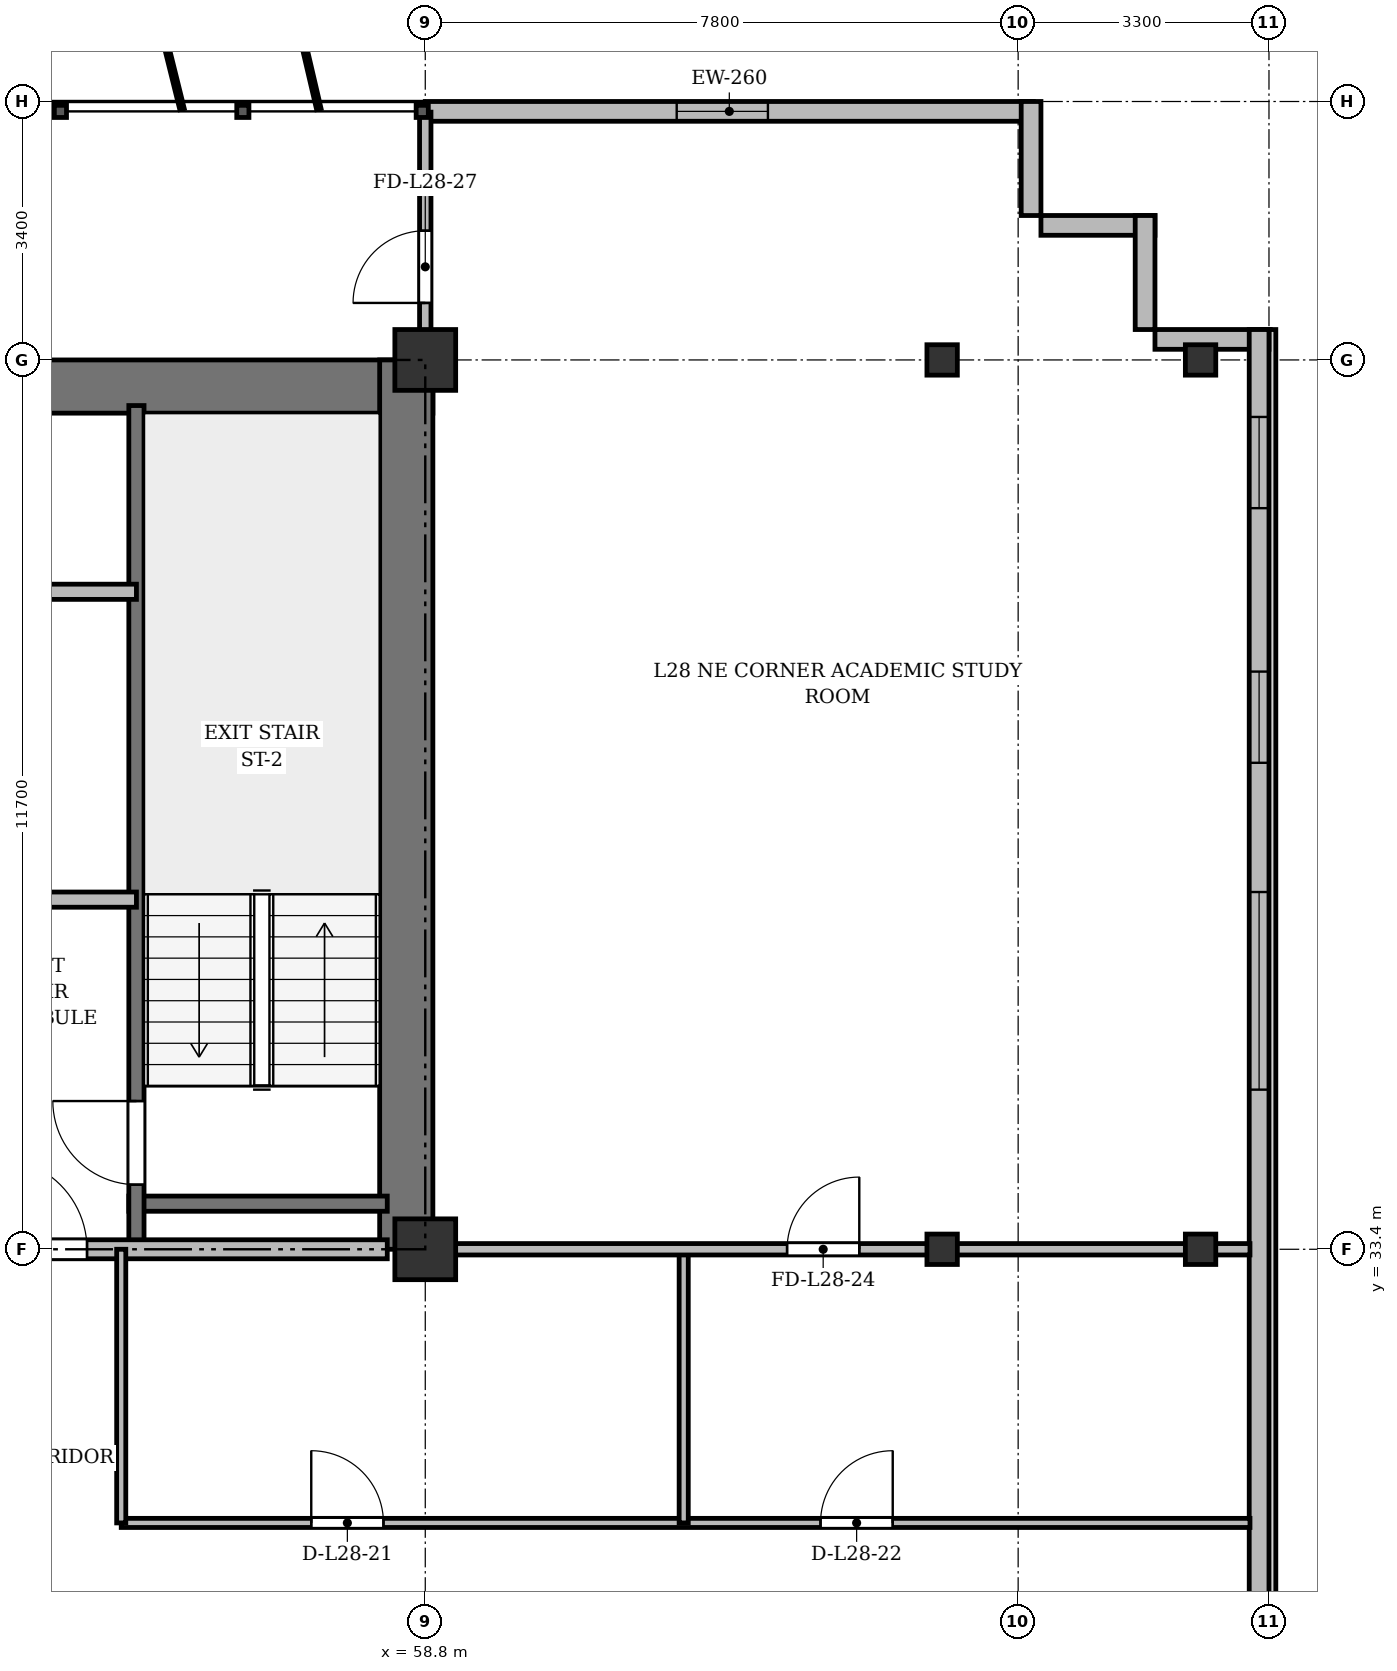
"""IFC4 building model, lengths in metres.
Left out: names, types, materials, properties, quantities, classifications, styles, units other than length and angle.
Written with IfcOpenShell. Run it as: python <this file> out.ifc"""

import sys

from ifc_helpers import new_model, si_unit, direction, frame, frame_2d, origin, origin_2d, place, context, subcontext, project, spatial, rectangle, i_section, extrude, source, transform, mapped, element, fill, save


model = new_model("IFC4")
c1 = context("Model", 3, precision=1e-05, world=origin(), true_north=direction((0.0, 1.0)))
c2 = subcontext(c1, "Body", "Model", "MODEL_VIEW")
j1 = project(units=[si_unit("LENGTHUNIT", "METRE"), si_unit("PLANEANGLEUNIT", "RADIAN")], contexts=[c1])
p1 = place(None, origin())
s1 = spatial("IfcSite", under=j1, at=p1, CompositionType="ELEMENT")
p2 = place(p1, origin())
s2 = spatial("IfcBuilding", under=s1, at=p2, CompositionType="ELEMENT")
p3 = place(p2, frame((0.0, 0.0, 110.5)))
s3 = spatial("IfcBuildingStorey", under=s2, at=p3, CompositionType="ELEMENT", Elevation=110.5)
m1 = source(origin(), c2, "Body", "SweptSolid", [
    extrude(rectangle(XDim=0.8, YDim=0.8, at=origin_2d()), origin(), (0.0, 0.0, 1.0), 3.6),
])
for number, where, z_axis, x_axis in (
    (1, (58.8, 33.4, 0.0), (0.0, 0.0, 1.0), (1.0, 0.0, 0.0)),
    (2, (58.8, 45.1, 0.0), (0.0, 0.0, 1.0), (1.0, 0.0, 0.0)),
):
    element("IfcColumn", number, at=place(p3, frame(where, z_axis=z_axis, x_axis=x_axis)), inside=s3, PredefinedType="COLUMN", context=c2, shape_type="MappedRepresentation", body=[
        mapped(m1, transform((0.0, 0.0, 0.0), x_axis=(1.0, 0.0, 0.0), y_axis=(0.0, 1.0, 0.0), z_axis=(0.0, 0.0, 1.0), scale=1.0)),
    ])
m2 = source(origin(), c2, "Body", "SweptSolid", [
    extrude(i_section(OverallWidth=0.4, OverallDepth=0.4, WebThickness=0.022, FlangeThickness=0.035, at=origin_2d()), origin(), (0.0, 0.0, 1.0), 3.6),
])
for number, where, z_axis, x_axis in (
    (3, (65.6, 33.4, 0.0), (0.0, 0.0, 1.0), (1.0, 0.0, 0.0)),
    (4, (65.6, 45.1, 0.0), (0.0, 0.0, 1.0), (1.0, 0.0, 0.0)),
    (5, (69.0, 33.4, 0.0), (0.0, 0.0, 1.0), (1.0, 0.0, 0.0)),
    (6, (69.0, 45.1, 0.0), (0.0, 0.0, 1.0), (1.0, 0.0, 0.0)),
):
    element("IfcColumn", number, at=place(p3, frame(where, z_axis=z_axis, x_axis=x_axis)), inside=s3, PredefinedType="COLUMN", context=c2, shape_type="MappedRepresentation", body=[
        mapped(m2, transform((0.0, 0.0, 0.0), x_axis=(1.0, 0.0, 0.0), y_axis=(0.0, 1.0, 0.0), z_axis=(0.0, 0.0, 1.0), scale=1.0)),
    ])
p4 = place(p3, frame((58.8, 48.37, 0.0), z_axis=(0.0, 0.0, 1.0), x_axis=(1.0, 0.0, 0.0)))
e7 = element("IfcWall", 7, at=p4, inside=s3, PredefinedType="SOLIDWALL", context=c2, shape_type="SweptSolid", body=[
    extrude(rectangle(XDim=8.0, YDim=0.26, at=frame_2d((4.0, 0.0))), origin(), (0.0, 0.0, 1.0), 3.34),
])
p5 = place(p4, frame((3.308, 0.0, 0.9)))
e8 = element("IfcOpeningElement", 8, at=p5, cuts=e7, PredefinedType="OPENING", context=c2, shape_type="SweptSolid", body=[
    extrude(rectangle(XDim=1.2, YDim=1.65, at=frame_2d((0.6, 0.825))), frame((0.0, 0.14, 0.0), z_axis=(0.0, -1.0, 0.0), x_axis=(1.0, 0.0, 0.0)), (0.0, 0.0, 1.0), 0.28),
])
for number, where, z_axis, x_axis in (
    (9, (66.77, 48.5, 0.0), (0.0, 0.0, 1.0), (0.0, -1.0, 0.0)),
    (10, (66.9, 46.87, 0.0), (0.0, 0.0, 1.0), (1.0, 0.0, 0.0)),
    (11, (68.27, 47.0, 0.0), (0.0, 0.0, 1.0), (0.0, -1.0, 0.0)),
):
    element("IfcWall", number, at=place(p3, frame(where, z_axis=z_axis, x_axis=x_axis)), inside=s3, PredefinedType="SOLIDWALL", context=c2, shape_type="SweptSolid", body=[
        extrude(rectangle(XDim=1.5, YDim=0.26, at=frame_2d((0.75, 0.0))), origin(), (0.0, 0.0, 1.0), 3.34),
    ])
p6 = place(p3, frame((68.4, 45.37, 0.0), z_axis=(0.0, 0.0, 1.0), x_axis=(1.0, 0.0, 0.0)))
e12 = element("IfcWall", 12, at=p6, inside=s3, PredefinedType="SOLIDWALL", context=c2, shape_type="SweptSolid", body=[
    extrude(rectangle(XDim=1.5, YDim=0.26, at=frame_2d((0.75, 0.0))), origin(), (0.0, 0.0, 1.0), 2.752),
])
p7 = place(p3, frame((69.77, 45.5, 0.0), z_axis=(0.0, 0.0, 1.0), x_axis=(0.0, -1.0, 0.0)))
e13 = element("IfcWall", 13, at=p7, inside=s3, PredefinedType="SOLIDWALL", context=c2, shape_type="SweptSolid", body=[
    extrude(rectangle(XDim=39.6, YDim=0.26, at=frame_2d((19.8, 0.0))), origin(), (0.0, 0.0, 1.0), 3.34),
])
p8 = place(p7, frame((36.95, 0.0, 0.92)))
e14 = element("IfcOpeningElement", 14, at=p8, cuts=e13, PredefinedType="OPENING", context=c2, shape_type="SweptSolid", body=[
    extrude(rectangle(XDim=1.2, YDim=1.65, at=frame_2d((0.6, 0.825))), frame((0.0, 0.14, 0.0), z_axis=(0.0, -1.0, 0.0), x_axis=(1.0, 0.0, 0.0)), (0.0, 0.0, 1.0), 0.28),
])
p9 = place(p7, frame((32.8, 0.0, 0.92)))
e15 = element("IfcOpeningElement", 15, at=p9, cuts=e13, PredefinedType="OPENING", context=c2, shape_type="SweptSolid", body=[
    extrude(rectangle(XDim=2.6, YDim=1.9, at=frame_2d((1.3, 0.95))), frame((0.0, 0.14, 0.0), z_axis=(0.0, -1.0, 0.0), x_axis=(1.0, 0.0, 0.0)), (0.0, 0.0, 1.0), 0.28),
])
p10 = place(p7, frame((28.6, 0.0, 0.92)))
e16 = element("IfcOpeningElement", 16, at=p10, cuts=e13, PredefinedType="OPENING", context=c2, shape_type="SweptSolid", body=[
    extrude(rectangle(XDim=2.6, YDim=1.9, at=frame_2d((1.3, 0.95))), frame((0.0, 0.14, 0.0), z_axis=(0.0, -1.0, 0.0), x_axis=(1.0, 0.0, 0.0)), (0.0, 0.0, 1.0), 0.28),
])
p11 = place(p7, frame((21.4, 0.0, 0.92)))
e17 = element("IfcOpeningElement", 17, at=p11, cuts=e13, PredefinedType="OPENING", context=c2, shape_type="SweptSolid", body=[
    extrude(rectangle(XDim=2.6, YDim=1.9, at=frame_2d((1.3, 0.95))), frame((0.0, 0.14, 0.0), z_axis=(0.0, -1.0, 0.0), x_axis=(1.0, 0.0, 0.0)), (0.0, 0.0, 1.0), 0.28),
])
p12 = place(p7, frame((7.4, 0.0, 0.92)))
e18 = element("IfcOpeningElement", 18, at=p12, cuts=e13, PredefinedType="OPENING", context=c2, shape_type="SweptSolid", body=[
    extrude(rectangle(XDim=2.6, YDim=1.9, at=frame_2d((1.3, 0.95))), frame((0.0, 0.14, 0.0), z_axis=(0.0, -1.0, 0.0), x_axis=(1.0, 0.0, 0.0)), (0.0, 0.0, 1.0), 0.28),
])
p13 = place(p7, frame((4.5, 0.0, 0.92)))
e19 = element("IfcOpeningElement", 19, at=p13, cuts=e13, PredefinedType="OPENING", context=c2, shape_type="SweptSolid", body=[
    extrude(rectangle(XDim=1.2, YDim=1.65, at=frame_2d((0.6, 0.825))), frame((0.0, 0.14, 0.0), z_axis=(0.0, -1.0, 0.0), x_axis=(1.0, 0.0, 0.0)), (0.0, 0.0, 1.0), 0.28),
])
p14 = place(p7, frame((1.15, 0.0, 0.92)))
e20 = element("IfcOpeningElement", 20, at=p14, cuts=e13, PredefinedType="OPENING", context=c2, shape_type="SweptSolid", body=[
    extrude(rectangle(XDim=1.2, YDim=1.65, at=frame_2d((0.6, 0.825))), frame((0.0, 0.14, 0.0), z_axis=(0.0, -1.0, 0.0), x_axis=(1.0, 0.0, 0.0)), (0.0, 0.0, 1.0), 0.28),
])
p15 = place(p3, frame((15.5, 44.75, 0.0), z_axis=(0.0, 0.0, 1.0), x_axis=(1.0, 0.0, 0.0)))
e21 = element("IfcWall", 21, at=p15, inside=s3, PredefinedType="SHEAR", context=c2, shape_type="SweptSolid", body=[
    extrude(rectangle(XDim=43.4, YDim=0.7, at=frame_2d((21.7, 0.0))), origin(), (0.0, 0.0, 1.0), 3.34),
])
p16 = place(p3, frame((58.55, 33.4, 0.0), z_axis=(0.0, 0.0, 1.0), x_axis=(0.0, 1.0, 0.0)))
e22 = element("IfcWall", 22, at=p16, inside=s3, PredefinedType="SHEAR", context=c2, shape_type="SweptSolid", body=[
    extrude(rectangle(XDim=11.7, YDim=0.7, at=frame_2d((5.85, 0.0))), origin(), (0.0, 0.0, 1.0), 3.34),
])
p17 = place(p3, frame((54.9, 34.0, 0.0), z_axis=(0.0, 0.0, 1.0), x_axis=(1.0, 0.0, 0.0)))
e23 = element("IfcWall", 23, at=p17, inside=s3, PredefinedType="SHEAR", context=c2, shape_type="SweptSolid", body=[
    extrude(rectangle(XDim=3.4, YDim=0.2, at=frame_2d((1.7, 0.0))), origin(), (0.0, 0.0, 1.0), 3.34),
])
p18 = place(p3, frame((55.0, 33.4, 0.0), z_axis=(0.0, 0.0, 1.0), x_axis=(0.0, 1.0, 0.0)))
e24 = element("IfcWall", 24, at=p18, inside=s3, PredefinedType="SHEAR", context=c2, shape_type="SweptSolid", body=[
    extrude(rectangle(XDim=11.1, YDim=0.2, at=frame_2d((5.55, 0.0))), origin(), (0.0, 0.0, 1.0), 3.34),
])
p19 = place(p18, frame((0.85, 0.0, 0.0)))
e25 = element("IfcOpeningElement", 25, at=p19, cuts=e24, PredefinedType="OPENING", context=c2, shape_type="SweptSolid", body=[
    extrude(rectangle(XDim=1.1, YDim=2.15, at=frame_2d((0.55, 1.075))), frame((0.0, 0.11, 0.0), z_axis=(0.0, -1.0, 0.0), x_axis=(1.0, 0.0, 0.0)), (0.0, 0.0, 1.0), 0.22),
])
p20 = place(p3, frame((47.15, 42.05, 0.0), z_axis=(0.0, 0.0, 1.0), x_axis=(1.0, 0.0, 0.0)))
e26 = element("IfcWall", 26, at=p20, inside=s3, PredefinedType="SOLIDWALL", context=c2, shape_type="SweptSolid", body=[
    extrude(rectangle(XDim=7.85, YDim=0.2, at=frame_2d((3.925, 0.0))), origin(), (0.0, 0.0, 1.0), 2.84),
])
p21 = place(p20, frame((0.75, 0.0, 0.0)))
e27 = element("IfcOpeningElement", 27, at=p21, cuts=e26, PredefinedType="OPENING", context=c2, shape_type="SweptSolid", body=[
    extrude(rectangle(XDim=0.9, YDim=2.1, at=frame_2d((0.45, 1.05))), frame((0.0, 0.11, 0.0), z_axis=(0.0, -1.0, 0.0), x_axis=(1.0, 0.0, 0.0)), (0.0, 0.0, 1.0), 0.22),
])
p22 = place(p20, frame((3.85, 0.0, 0.0)))
e28 = element("IfcOpeningElement", 28, at=p22, cuts=e26, PredefinedType="OPENING", context=c2, shape_type="SweptSolid", body=[
    extrude(rectangle(XDim=0.9, YDim=2.1, at=frame_2d((0.45, 1.05))), frame((0.0, 0.11, 0.0), z_axis=(0.0, -1.0, 0.0), x_axis=(1.0, 0.0, 0.0)), (0.0, 0.0, 1.0), 0.22),
])
p23 = place(p3, frame((52.45, 38.0, 0.0), z_axis=(0.0, 0.0, 1.0), x_axis=(1.0, 0.0, 0.0)))
e29 = element("IfcWall", 29, at=p23, inside=s3, PredefinedType="PARTITIONING", context=c2, shape_type="SweptSolid", body=[
    extrude(rectangle(XDim=2.55, YDim=0.2, at=frame_2d((1.275, 0.0))), origin(), (0.0, 0.0, 1.0), 3.34),
])
p24 = place(p3, frame((47.15, 33.4, 0.0), z_axis=(0.0, 0.0, 1.0), x_axis=(1.0, 0.0, 0.0)))
e30 = element("IfcWall", 30, at=p24, inside=s3, PredefinedType="PARTITIONING", context=c2, shape_type="SweptSolid", body=[
    extrude(rectangle(XDim=11.15, YDim=0.25, at=frame_2d((5.575, 0.0))), origin(), (0.0, 0.0, 1.0), 2.752),
])
p25 = place(p24, frame((0.7, 0.0, 0.0)))
e31 = element("IfcOpeningElement", 31, at=p25, cuts=e30, PredefinedType="OPENING", context=c2, shape_type="SweptSolid", body=[
    extrude(rectangle(XDim=0.95, YDim=2.15, at=frame_2d((0.475, 1.075))), frame((0.0, 0.135, 0.0), z_axis=(0.0, -1.0, 0.0), x_axis=(1.0, 0.0, 0.0)), (0.0, 0.0, 1.0), 0.27),
])
p26 = place(p24, frame((6.0, 0.0, 0.0)))
e32 = element("IfcOpeningElement", 32, at=p26, cuts=e30, PredefinedType="OPENING", context=c2, shape_type="SweptSolid", body=[
    extrude(rectangle(XDim=1.2, YDim=2.15, at=frame_2d((0.6, 1.075))), frame((0.0, 0.135, 0.0), z_axis=(0.0, -1.0, 0.0), x_axis=(1.0, 0.0, 0.0)), (0.0, 0.0, 1.0), 0.27),
])
p27 = place(p3, frame((54.8, 29.8, 0.0), z_axis=(0.0, 0.0, 1.0), x_axis=(1.0, 0.0, 0.0)))
e33 = element("IfcWall", 33, at=p27, inside=s3, PredefinedType="PARTITIONING", context=c2, shape_type="SweptSolid", body=[
    extrude(rectangle(XDim=14.85, YDim=0.12, at=frame_2d((7.425, 0.0))), origin(), (0.0, 0.0, 1.0), 2.84),
])
p28 = place(p27, frame((2.5, 0.0, 0.0)))
e34 = element("IfcOpeningElement", 34, at=p28, cuts=e33, PredefinedType="OPENING", context=c2, shape_type="SweptSolid", body=[
    extrude(rectangle(XDim=0.95, YDim=2.15, at=frame_2d((0.475, 1.075))), frame((0.0, 0.07, 0.0), z_axis=(0.0, -1.0, 0.0), x_axis=(1.0, 0.0, 0.0)), (0.0, 0.0, 1.0), 0.14),
])
p29 = place(p27, frame((9.2, 0.0, 0.0)))
e35 = element("IfcOpeningElement", 35, at=p29, cuts=e33, PredefinedType="OPENING", context=c2, shape_type="SweptSolid", body=[
    extrude(rectangle(XDim=0.95, YDim=2.15, at=frame_2d((0.475, 1.075))), frame((0.0, 0.07, 0.0), z_axis=(0.0, -1.0, 0.0), x_axis=(1.0, 0.0, 0.0)), (0.0, 0.0, 1.0), 0.14),
])
for number, where, z_axis, x_axis in (
    (36, (62.2, 29.8, 0.0), (0.0, 0.0, 1.0), (0.0, 1.0, 0.0)),
    (37, (54.8, 29.8, 0.0), (0.0, 0.0, 1.0), (0.0, 1.0, 0.0)),
):
    element("IfcWall", number, at=place(p3, frame(where, z_axis=z_axis, x_axis=x_axis)), inside=s3, PredefinedType="PARTITIONING", context=c2, shape_type="SweptSolid", body=[
        extrude(rectangle(XDim=3.6, YDim=0.12, at=frame_2d((1.8, 0.0))), origin(), (0.0, 0.0, 1.0), 2.752),
    ])
p30 = place(p3, frame((58.8, 33.4, 0.0), z_axis=(0.0, 0.0, 1.0), x_axis=(1.0, 0.0, 0.0)))
e38 = element("IfcWall", 38, at=p30, inside=s3, PredefinedType="PARTITIONING", context=c2, shape_type="SweptSolid", body=[
    extrude(rectangle(XDim=10.85, YDim=0.15, at=frame_2d((5.425, 0.0))), origin(), (0.0, 0.0, 1.0), 2.752),
])
p31 = place(p30, frame((4.76, 0.0, 0.0)))
e39 = element("IfcOpeningElement", 39, at=p31, cuts=e38, PredefinedType="OPENING", context=c2, shape_type="SweptSolid", body=[
    extrude(rectangle(XDim=0.95, YDim=2.15, at=frame_2d((0.475, 1.075))), frame((0.0, 0.085, 0.0), z_axis=(0.0, -1.0, 0.0), x_axis=(1.0, 0.0, 0.0)), (0.0, 0.0, 1.0), 0.17),
])
p32 = place(p3, frame((58.8, 44.75, 0.0), z_axis=(0.0, 0.0, 1.0), x_axis=(0.0, 1.0, 0.0)))
e40 = element("IfcWall", 40, at=p32, inside=s3, PredefinedType="PARTITIONING", context=c2, shape_type="SweptSolid", body=[
    extrude(rectangle(XDim=3.61, YDim=0.15, at=frame_2d((1.805, 0.0))), origin(), (0.0, 0.0, 1.0), 2.84),
])
p33 = place(p32, frame((1.1, 0.0, 0.0)))
e41 = element("IfcOpeningElement", 41, at=p33, cuts=e40, PredefinedType="OPENING", context=c2, shape_type="SweptSolid", body=[
    extrude(rectangle(XDim=0.95, YDim=2.15, at=frame_2d((0.475, 1.075))), frame((0.0, 0.085, 0.0), z_axis=(0.0, -1.0, 0.0), x_axis=(1.0, 0.0, 0.0)), (0.0, 0.0, 1.0), 0.17),
])
m3 = source(origin(), c2, "Body", "SweptSolid", [
    extrude(rectangle(XDim=1.2, YDim=1.65, at=frame_2d((0.6, 0.825))), frame((0.0, 0.03, 0.0), z_axis=(0.0, -1.0, 0.0), x_axis=(1.0, 0.0, 0.0)), (0.0, 0.0, 1.0), 0.06),
])
p34 = place(p5, origin())
e42 = element("IfcWindow", 42, at=p34, inside=s3, PartitioningType="SINGLE_PANEL", PredefinedType="WINDOW", context=c2, shape_type="MappedRepresentation", body=[
    mapped(m3, transform((0.0, 0.0, 0.0), x_axis=(1.0, 0.0, 0.0), y_axis=(0.0, 1.0, 0.0), z_axis=(0.0, 0.0, 1.0), scale=1.0)),
])
fill(e8, e42)
m4 = source(origin(), c2, "Body", "SweptSolid", [
    extrude(rectangle(XDim=2.6, YDim=1.9, at=frame_2d((1.3, 0.95))), frame((0.0, 0.03, 0.0), z_axis=(0.0, -1.0, 0.0), x_axis=(1.0, 0.0, 0.0)), (0.0, 0.0, 1.0), 0.06),
])
p35 = place(p12, origin())
e43 = element("IfcWindow", 43, at=p35, inside=s3, PartitioningType="SINGLE_PANEL", PredefinedType="WINDOW", context=c2, shape_type="MappedRepresentation", body=[
    mapped(m4, transform((0.0, 0.0, 0.0), x_axis=(1.0, 0.0, 0.0), y_axis=(0.0, 1.0, 0.0), z_axis=(0.0, 0.0, 1.0), scale=1.0)),
])
fill(e18, e43)
p36 = place(p13, origin())
e44 = element("IfcWindow", 44, at=p36, inside=s3, PartitioningType="SINGLE_PANEL", PredefinedType="WINDOW", context=c2, shape_type="MappedRepresentation", body=[
    mapped(m3, transform((0.0, 0.0, 0.0), x_axis=(1.0, 0.0, 0.0), y_axis=(0.0, 1.0, 0.0), z_axis=(0.0, 0.0, 1.0), scale=1.0)),
])
fill(e19, e44)
p37 = place(p14, origin())
e45 = element("IfcWindow", 45, at=p37, inside=s3, PartitioningType="SINGLE_PANEL", PredefinedType="WINDOW", context=c2, shape_type="MappedRepresentation", body=[
    mapped(m3, transform((0.0, 0.0, 0.0), x_axis=(1.0, 0.0, 0.0), y_axis=(0.0, 1.0, 0.0), z_axis=(0.0, 0.0, 1.0), scale=1.0)),
])
fill(e20, e45)
m5 = source(origin(), c2, "Body", "SweptSolid", [
    extrude(rectangle(XDim=1.1, YDim=2.15, at=frame_2d((0.55, 1.075))), frame((0.0, 0.025, 0.0), z_axis=(0.0, -1.0, 0.0), x_axis=(1.0, 0.0, 0.0)), (0.0, 0.0, 1.0), 0.05),
])
p38 = place(p19, origin())
e46 = element("IfcDoor", 46, at=p38, inside=s3, OperationType="SINGLE_SWING_RIGHT", PredefinedType="DOOR", context=c2, shape_type="MappedRepresentation", body=[
    mapped(m5, transform((0.0, 0.0, 0.0), x_axis=(1.0, 0.0, 0.0), y_axis=(0.0, 1.0, 0.0), z_axis=(0.0, 0.0, 1.0), scale=1.0)),
])
fill(e25, e46)
m6 = source(origin(), c2, "Body", "SweptSolid", [
    extrude(rectangle(XDim=1.2, YDim=2.15, at=frame_2d((0.6, 1.075))), frame((0.0, 0.025, 0.0), z_axis=(0.0, -1.0, 0.0), x_axis=(1.0, 0.0, 0.0)), (0.0, 0.0, 1.0), 0.05),
])
p39 = place(p26, origin())
e47 = element("IfcDoor", 47, at=p39, inside=s3, OperationType="SINGLE_SWING_LEFT", PredefinedType="DOOR", context=c2, shape_type="MappedRepresentation", body=[
    mapped(m6, transform((0.0, 0.0, 0.0), x_axis=(1.0, 0.0, 0.0), y_axis=(0.0, 1.0, 0.0), z_axis=(0.0, 0.0, 1.0), scale=1.0)),
])
fill(e32, e47)
m7 = source(origin(), c2, "Body", "SweptSolid", [
    extrude(rectangle(XDim=0.95, YDim=2.15, at=frame_2d((0.475, 1.075))), frame((0.0, 0.025, 0.0), z_axis=(0.0, -1.0, 0.0), x_axis=(1.0, 0.0, 0.0)), (0.0, 0.0, 1.0), 0.05),
])
p40 = place(p28, origin())
e48 = element("IfcDoor", 48, at=p40, inside=s3, OperationType="SINGLE_SWING_LEFT", PredefinedType="DOOR", context=c2, shape_type="MappedRepresentation", body=[
    mapped(m7, transform((0.0, 0.0, 0.0), x_axis=(1.0, 0.0, 0.0), y_axis=(0.0, 1.0, 0.0), z_axis=(0.0, 0.0, 1.0), scale=1.0)),
])
fill(e34, e48)
p41 = place(p29, origin())
e49 = element("IfcDoor", 49, at=p41, inside=s3, OperationType="SINGLE_SWING_RIGHT", PredefinedType="DOOR", context=c2, shape_type="MappedRepresentation", body=[
    mapped(m7, transform((0.0, 0.0, 0.0), x_axis=(1.0, 0.0, 0.0), y_axis=(0.0, 1.0, 0.0), z_axis=(0.0, 0.0, 1.0), scale=1.0)),
])
fill(e35, e49)
p42 = place(p31, origin())
e50 = element("IfcDoor", 50, at=p42, inside=s3, OperationType="SINGLE_SWING_RIGHT", PredefinedType="DOOR", context=c2, shape_type="MappedRepresentation", body=[
    mapped(m7, transform((0.0, 0.0, 0.0), x_axis=(1.0, 0.0, 0.0), y_axis=(0.0, 1.0, 0.0), z_axis=(0.0, 0.0, 1.0), scale=1.0)),
])
fill(e39, e50)
p43 = place(p33, origin())
e51 = element("IfcDoor", 51, at=p43, inside=s3, OperationType="SINGLE_SWING_LEFT", PredefinedType="DOOR", context=c2, shape_type="MappedRepresentation", body=[
    mapped(m7, transform((0.0, 0.0, 0.0), x_axis=(1.0, 0.0, 0.0), y_axis=(0.0, 1.0, 0.0), z_axis=(0.0, 0.0, 1.0), scale=1.0)),
])
fill(e41, e51)
save(model, sys.argv[1])
